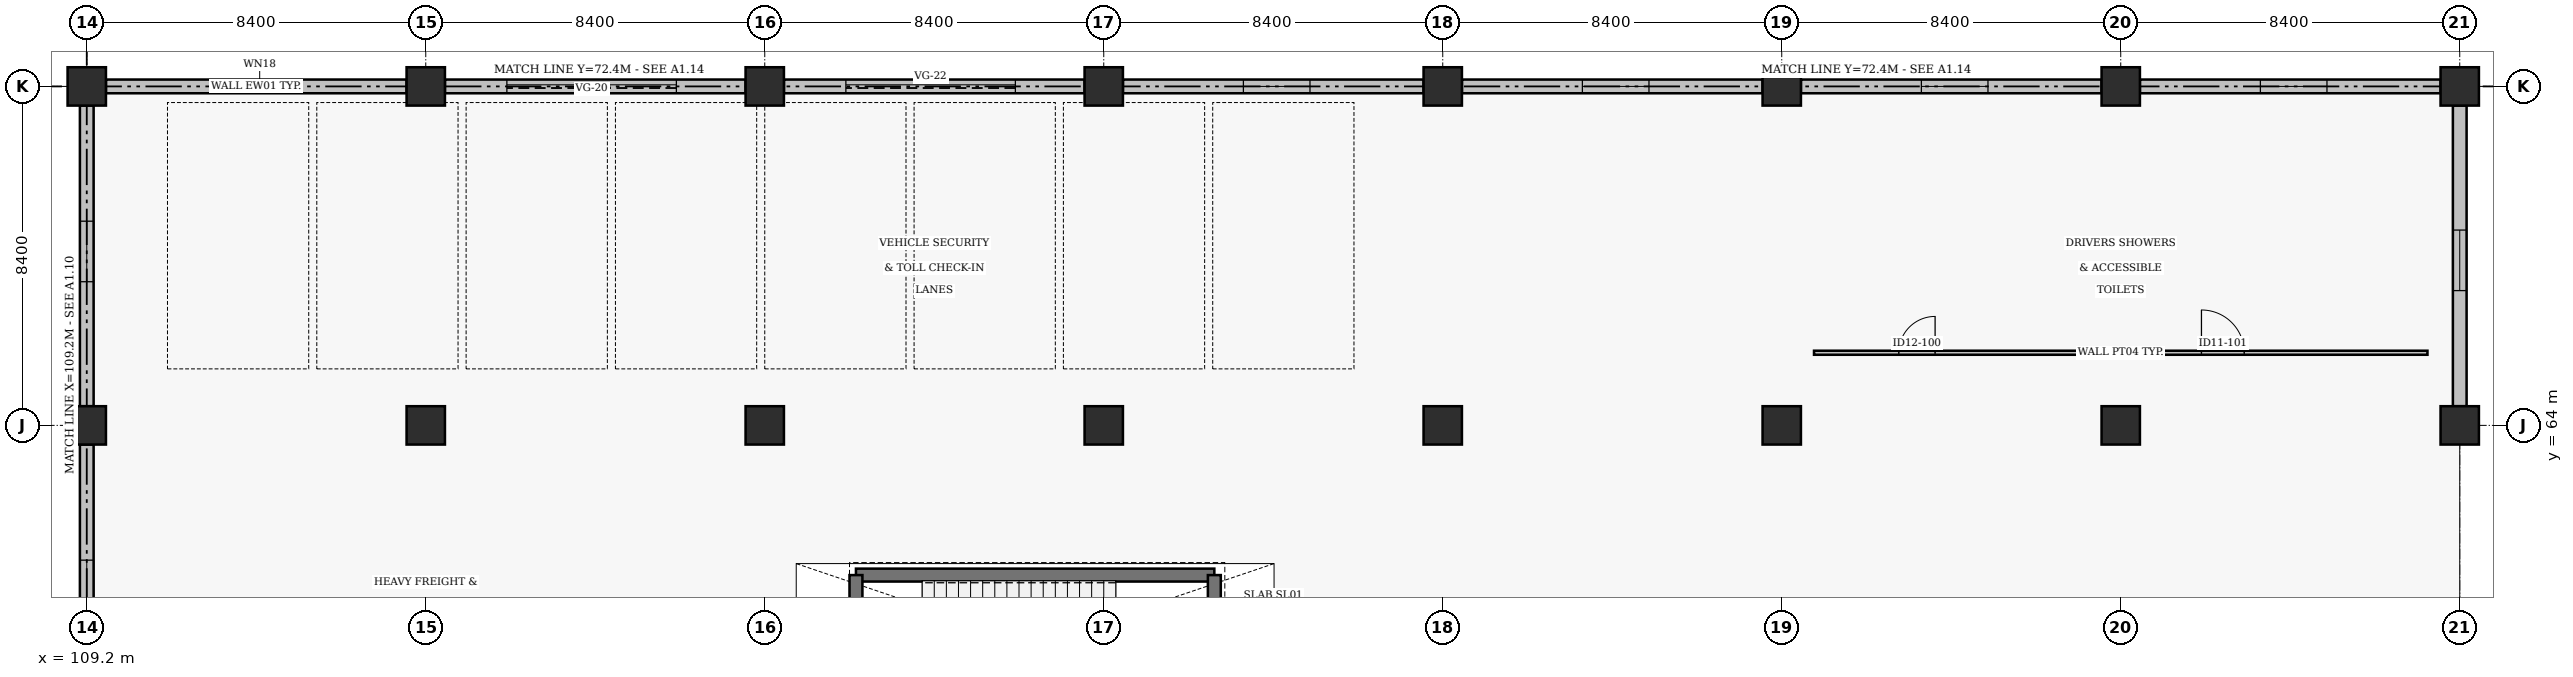
"""IFC4 building model, lengths in metres.
Left out: names, types, materials, properties, quantities, classifications, styles, units other than length and angle.
Written with IfcOpenShell. Run it as: python <this file> out.ifc"""

import sys

from ifc_helpers import new_model, si_unit, direction, frame, frame_2d, origin, origin_2d, place, context, subcontext, project, spatial, rectangle, extrude, element, fill, save


model = new_model("IFC4")
c1 = context("Model", 3, precision=1e-05, world=origin(), true_north=direction((0.0, 1.0)))
c2 = subcontext(c1, "Body", "Model", "MODEL_VIEW")
j1 = project(units=[si_unit("LENGTHUNIT", "METRE"), si_unit("PLANEANGLEUNIT", "RADIAN")], contexts=[c1])
p1 = place(None, origin())
s1 = spatial("IfcSite", under=j1, at=p1, CompositionType="ELEMENT")
p2 = place(p1, origin())
s2 = spatial("IfcBuilding", under=s1, at=p2, CompositionType="ELEMENT")
p3 = place(p2, origin())
s3 = spatial("IfcBuildingStorey", under=s2, at=p3, CompositionType="ELEMENT", Elevation=0.0)
for number, where, z_axis, x_axis in (
    (1, (109.2, 64.0, -0.46), (0.0, 0.0, 1.0), (1.0, 0.0, 0.0)),
    (2, (109.2, 72.4, -0.46), (0.0, 0.0, 1.0), (1.0, 0.0, 0.0)),
    (3, (117.6, 64.0, -0.46), (0.0, 0.0, 1.0), (1.0, 0.0, 0.0)),
    (4, (117.6, 72.4, -0.46), (0.0, 0.0, 1.0), (1.0, 0.0, 0.0)),
    (5, (126.0, 64.0, -0.46), (0.0, 0.0, 1.0), (1.0, 0.0, 0.0)),
    (6, (126.0, 72.4, -0.46), (0.0, 0.0, 1.0), (1.0, 0.0, 0.0)),
    (7, (134.4, 64.0, -0.46), (0.0, 0.0, 1.0), (1.0, 0.0, 0.0)),
    (8, (134.4, 72.4, -0.46), (0.0, 0.0, 1.0), (1.0, 0.0, 0.0)),
    (9, (142.8, 64.0, -0.46), (0.0, 0.0, 1.0), (1.0, 0.0, 0.0)),
    (10, (142.8, 72.4, -0.46), (0.0, 0.0, 1.0), (1.0, 0.0, 0.0)),
    (11, (151.2, 64.0, -0.46), (0.0, 0.0, 1.0), (1.0, 0.0, 0.0)),
    (12, (151.2, 72.4, -0.46), (0.0, 0.0, 1.0), (1.0, 0.0, 0.0)),
    (13, (159.6, 64.0, -0.46), (0.0, 0.0, 1.0), (1.0, 0.0, 0.0)),
    (14, (159.6, 72.4, -0.46), (0.0, 0.0, 1.0), (1.0, 0.0, 0.0)),
    (15, (168.0, 64.0, -0.46), (0.0, 0.0, 1.0), (1.0, 0.0, 0.0)),
    (16, (168.0, 72.4, -0.46), (0.0, 0.0, 1.0), (1.0, 0.0, 0.0)),
):
    element("IfcColumn", number, at=place(p3, frame(where, z_axis=z_axis, x_axis=x_axis)), inside=s3, PredefinedType="COLUMN", context=c2, shape_type="SweptSolid", body=[
        extrude(rectangle(XDim=0.95, YDim=0.95, at=origin_2d()), origin(), (0.0, 0.0, 1.0), 5.9),
    ])
p4 = place(p3, frame((117.125, 72.4, 0.0), z_axis=(0.0, 0.0, 1.0), x_axis=(-1.0, 0.0, 0.0)))
e17 = element("IfcWall", 17, at=p4, inside=s3, PredefinedType="SOLIDWALL", context=c2, shape_type="SweptSolid", body=[
    extrude(rectangle(XDim=7.45, YDim=0.34, at=frame_2d((3.725, 0.0))), origin(), (0.0, 0.0, 1.0), 4.545),
])
p5 = place(p4, frame((2.815, 0.0, 1.05)))
e18 = element("IfcOpeningElement", 18, at=p5, cuts=e17, PredefinedType="OPENING", context=c2, shape_type="SweptSolid", body=[
    extrude(rectangle(XDim=1.65, YDim=1.4, at=frame_2d((0.825, 0.7))), frame((0.0, 0.18, 0.0), z_axis=(0.0, -1.0, 0.0), x_axis=(1.0, 0.0, 0.0)), (0.0, 0.0, 1.0), 0.36),
])
p6 = place(p3, frame((125.525, 72.4, 0.0), z_axis=(0.0, 0.0, 1.0), x_axis=(-1.0, 0.0, 0.0)))
e19 = element("IfcWall", 19, at=p6, inside=s3, PredefinedType="SOLIDWALL", context=c2, shape_type="SweptSolid", body=[
    extrude(rectangle(XDim=7.45, YDim=0.34, at=frame_2d((3.725, 0.0))), origin(), (0.0, 0.0, 1.0), 4.545),
])
p7 = place(p6, frame((1.715, 0.0, 0.0)))
e20 = element("IfcOpeningElement", 20, at=p7, cuts=e19, PredefinedType="OPENING", context=c2, shape_type="SweptSolid", body=[
    extrude(rectangle(XDim=4.2, YDim=4.3, at=frame_2d((2.1, 2.15))), frame((0.0, 0.18, 0.0), z_axis=(0.0, -1.0, 0.0), x_axis=(1.0, 0.0, 0.0)), (0.0, 0.0, 1.0), 0.36),
])
p8 = place(p3, frame((133.925, 72.4, 0.0), z_axis=(0.0, 0.0, 1.0), x_axis=(-1.0, 0.0, 0.0)))
e21 = element("IfcWall", 21, at=p8, inside=s3, PredefinedType="SOLIDWALL", context=c2, shape_type="SweptSolid", body=[
    extrude(rectangle(XDim=7.45, YDim=0.34, at=frame_2d((3.725, 0.0))), origin(), (0.0, 0.0, 1.0), 4.545),
])
p9 = place(p8, frame((1.715, 0.0, 0.0)))
e22 = element("IfcOpeningElement", 22, at=p9, cuts=e21, PredefinedType="OPENING", context=c2, shape_type="SweptSolid", body=[
    extrude(rectangle(XDim=4.2, YDim=4.3, at=frame_2d((2.1, 2.15))), frame((0.0, 0.18, 0.0), z_axis=(0.0, -1.0, 0.0), x_axis=(1.0, 0.0, 0.0)), (0.0, 0.0, 1.0), 0.36),
])
p10 = place(p3, frame((142.325, 72.4, 0.0), z_axis=(0.0, 0.0, 1.0), x_axis=(-1.0, 0.0, 0.0)))
e23 = element("IfcWall", 23, at=p10, inside=s3, PredefinedType="SOLIDWALL", context=c2, shape_type="SweptSolid", body=[
    extrude(rectangle(XDim=7.45, YDim=0.34, at=frame_2d((3.725, 0.0))), origin(), (0.0, 0.0, 1.0), 4.545),
])
p11 = place(p10, frame((2.815, 0.0, 1.05)))
e24 = element("IfcOpeningElement", 24, at=p11, cuts=e23, PredefinedType="OPENING", context=c2, shape_type="SweptSolid", body=[
    extrude(rectangle(XDim=1.65, YDim=1.4, at=frame_2d((0.825, 0.7))), frame((0.0, 0.18, 0.0), z_axis=(0.0, -1.0, 0.0), x_axis=(1.0, 0.0, 0.0)), (0.0, 0.0, 1.0), 0.36),
])
p12 = place(p3, frame((150.725, 72.4, 0.0), z_axis=(0.0, 0.0, 1.0), x_axis=(-1.0, 0.0, 0.0)))
e25 = element("IfcWall", 25, at=p12, inside=s3, PredefinedType="SOLIDWALL", context=c2, shape_type="SweptSolid", body=[
    extrude(rectangle(XDim=7.45, YDim=0.34, at=frame_2d((3.725, 0.0))), origin(), (0.0, 0.0, 1.0), 4.545),
])
p13 = place(p12, frame((2.815, 0.0, 1.05)))
e26 = element("IfcOpeningElement", 26, at=p13, cuts=e25, PredefinedType="OPENING", context=c2, shape_type="SweptSolid", body=[
    extrude(rectangle(XDim=1.65, YDim=1.4, at=frame_2d((0.825, 0.7))), frame((0.0, 0.18, 0.0), z_axis=(0.0, -1.0, 0.0), x_axis=(1.0, 0.0, 0.0)), (0.0, 0.0, 1.0), 0.36),
])
p14 = place(p3, frame((159.125, 72.4, 0.0), z_axis=(0.0, 0.0, 1.0), x_axis=(-1.0, 0.0, 0.0)))
e27 = element("IfcWall", 27, at=p14, inside=s3, PredefinedType="SOLIDWALL", context=c2, shape_type="SweptSolid", body=[
    extrude(rectangle(XDim=7.45, YDim=0.34, at=frame_2d((3.725, 0.0))), origin(), (0.0, 0.0, 1.0), 4.545),
])
p15 = place(p14, frame((2.815, 0.0, 1.05)))
e28 = element("IfcOpeningElement", 28, at=p15, cuts=e27, PredefinedType="OPENING", context=c2, shape_type="SweptSolid", body=[
    extrude(rectangle(XDim=1.65, YDim=1.4, at=frame_2d((0.825, 0.7))), frame((0.0, 0.18, 0.0), z_axis=(0.0, -1.0, 0.0), x_axis=(1.0, 0.0, 0.0)), (0.0, 0.0, 1.0), 0.36),
])
p16 = place(p3, frame((167.525, 72.4, 0.0), z_axis=(0.0, 0.0, 1.0), x_axis=(-1.0, 0.0, 0.0)))
e29 = element("IfcWall", 29, at=p16, inside=s3, PredefinedType="SOLIDWALL", context=c2, shape_type="SweptSolid", body=[
    extrude(rectangle(XDim=7.45, YDim=0.34, at=frame_2d((3.725, 0.0))), origin(), (0.0, 0.0, 1.0), 4.545),
])
p17 = place(p16, frame((2.815, 0.0, 1.05)))
e30 = element("IfcOpeningElement", 30, at=p17, cuts=e29, PredefinedType="OPENING", context=c2, shape_type="SweptSolid", body=[
    extrude(rectangle(XDim=1.65, YDim=1.4, at=frame_2d((0.825, 0.7))), frame((0.0, 0.18, 0.0), z_axis=(0.0, -1.0, 0.0), x_axis=(1.0, 0.0, 0.0)), (0.0, 0.0, 1.0), 0.36),
])
p18 = place(p3, frame((109.2, 63.525, 0.0), z_axis=(0.0, 0.0, 1.0), x_axis=(0.0, -1.0, 0.0)))
e31 = element("IfcWall", 31, at=p18, inside=s3, PredefinedType="SOLIDWALL", context=c2, shape_type="SweptSolid", body=[
    extrude(rectangle(XDim=7.45, YDim=0.34, at=frame_2d((3.725, 0.0))), origin(), (0.0, 0.0, 1.0), 4.545),
])
p19 = place(p18, frame((2.865, 0.0, 1.35)))
e32 = element("IfcOpeningElement", 32, at=p19, cuts=e31, PredefinedType="OPENING", context=c2, shape_type="SweptSolid", body=[
    extrude(rectangle(XDim=1.5, YDim=1.1, at=frame_2d((0.75, 0.55))), frame((0.0, 0.18, 0.0), z_axis=(0.0, -1.0, 0.0), x_axis=(1.0, 0.0, 0.0)), (0.0, 0.0, 1.0), 0.36),
])
p20 = place(p3, frame((109.2, 71.925, 0.0), z_axis=(0.0, 0.0, 1.0), x_axis=(0.0, -1.0, 0.0)))
e33 = element("IfcWall", 33, at=p20, inside=s3, PredefinedType="SOLIDWALL", context=c2, shape_type="SweptSolid", body=[
    extrude(rectangle(XDim=7.45, YDim=0.34, at=frame_2d((3.725, 0.0))), origin(), (0.0, 0.0, 1.0), 4.545),
])
p21 = place(p20, frame((2.865, 0.0, 1.35)))
e34 = element("IfcOpeningElement", 34, at=p21, cuts=e33, PredefinedType="OPENING", context=c2, shape_type="SweptSolid", body=[
    extrude(rectangle(XDim=1.5, YDim=1.1, at=frame_2d((0.75, 0.55))), frame((0.0, 0.18, 0.0), z_axis=(0.0, -1.0, 0.0), x_axis=(1.0, 0.0, 0.0)), (0.0, 0.0, 1.0), 0.36),
])
p22 = place(p3, frame((168.0, 64.475, 0.0), z_axis=(0.0, 0.0, 1.0), x_axis=(0.0, 1.0, 0.0)))
e35 = element("IfcWall", 35, at=p22, inside=s3, PredefinedType="SOLIDWALL", context=c2, shape_type="SweptSolid", body=[
    extrude(rectangle(XDim=7.45, YDim=0.34, at=frame_2d((3.725, 0.0))), origin(), (0.0, 0.0, 1.0), 4.545),
])
p23 = place(p22, frame((2.865, 0.0, 1.35)))
e36 = element("IfcOpeningElement", 36, at=p23, cuts=e35, PredefinedType="OPENING", context=c2, shape_type="SweptSolid", body=[
    extrude(rectangle(XDim=1.5, YDim=1.1, at=frame_2d((0.75, 0.55))), frame((0.0, 0.18, 0.0), z_axis=(0.0, -1.0, 0.0), x_axis=(1.0, 0.0, 0.0)), (0.0, 0.0, 1.0), 0.36),
])
p24 = place(p3, frame((128.26, 60.29, 0.0), z_axis=(0.0, 0.0, 1.0), x_axis=(1.0, 0.0, 0.0)))
e37 = element("IfcWall", 37, at=p24, inside=s3, PredefinedType="SHEAR", context=c2, shape_type="SweptSolid", body=[
    extrude(rectangle(XDim=8.88, YDim=0.32, at=frame_2d((4.44, 0.0))), origin(), (0.0, 0.0, 1.0), 5.44),
])
p25 = place(p3, frame((128.26, 60.29, 0.0), z_axis=(0.0, 0.0, 1.0), x_axis=(0.0, -1.0, 0.0)))
e38 = element("IfcWall", 38, at=p25, inside=s3, PredefinedType="SHEAR", context=c2, shape_type="SweptSolid", body=[
    extrude(rectangle(XDim=3.43, YDim=0.32, at=frame_2d((1.715, 0.0))), origin(), (0.0, 0.0, 1.0), 5.44),
])
p26 = place(p25, frame((0.975, 0.0, 0.0)))
e39 = element("IfcOpeningElement", 39, at=p26, cuts=e38, PredefinedType="OPENING", context=c2, shape_type="SweptSolid", body=[
    extrude(rectangle(XDim=1.48, YDim=2.15, at=frame_2d((0.74, 1.075))), frame((0.0, 0.17, 0.0), z_axis=(0.0, -1.0, 0.0), x_axis=(1.0, 0.0, 0.0)), (0.0, 0.0, 1.0), 0.34),
])
p27 = place(p3, frame((137.14, 56.86, 0.0), z_axis=(0.0, 0.0, 1.0), x_axis=(0.0, 1.0, 0.0)))
e40 = element("IfcWall", 40, at=p27, inside=s3, PredefinedType="SHEAR", context=c2, shape_type="SweptSolid", body=[
    extrude(rectangle(XDim=3.43, YDim=0.32, at=frame_2d((1.715, 0.0))), origin(), (0.0, 0.0, 1.0), 5.44),
])
p28 = place(p3, frame((152.0, 65.8, 0.0), z_axis=(0.0, 0.0, 1.0), x_axis=(1.0, 0.0, 0.0)))
e41 = element("IfcWall", 41, at=p28, inside=s3, PredefinedType="PARTITIONING", context=c2, shape_type="SweptSolid", body=[
    extrude(rectangle(XDim=15.2, YDim=0.1, at=frame_2d((7.6, 0.0))), origin(), (0.0, 0.0, 1.0), 3.0),
])
p29 = place(p28, frame((2.1, 0.0, 0.0)))
e42 = element("IfcOpeningElement", 42, at=p29, cuts=e41, PredefinedType="OPENING", context=c2, shape_type="SweptSolid", body=[
    extrude(rectangle(XDim=0.9, YDim=2.06, at=frame_2d((0.45, 1.03))), frame((0.0, 0.06, 0.0), z_axis=(0.0, -1.0, 0.0), x_axis=(1.0, 0.0, 0.0)), (0.0, 0.0, 1.0), 0.12),
])
p30 = place(p28, frame((9.6, 0.0, 0.0)))
e43 = element("IfcOpeningElement", 43, at=p30, cuts=e41, PredefinedType="OPENING", context=c2, shape_type="SweptSolid", body=[
    extrude(rectangle(XDim=1.06, YDim=2.1, at=frame_2d((0.53, 1.05))), frame((0.0, 0.06, 0.0), z_axis=(0.0, -1.0, 0.0), x_axis=(1.0, 0.0, 0.0)), (0.0, 0.0, 1.0), 0.12),
])
p31 = place(p5, origin())
e44 = element("IfcWindow", 44, at=p31, inside=s3, PartitioningType="DOUBLE_PANEL_VERTICAL", PredefinedType="WINDOW", context=c2, shape_type="SweptSolid", body=[
    extrude(rectangle(XDim=1.65, YDim=1.4, at=frame_2d((0.825, 0.7))), frame((0.0, 0.03, 0.0), z_axis=(0.0, -1.0, 0.0), x_axis=(1.0, 0.0, 0.0)), (0.0, 0.0, 1.0), 0.06),
])
fill(e18, e44)
p32 = place(p7, origin())
e45 = element("IfcDoor", 45, at=p32, inside=s3, OperationType="ROLLINGUP", PredefinedType="GATE", context=c2, shape_type="SweptSolid", body=[
    extrude(rectangle(XDim=4.2, YDim=4.3, at=frame_2d((2.1, 2.15))), frame((0.0, 0.025, 0.0), z_axis=(0.0, -1.0, 0.0), x_axis=(1.0, 0.0, 0.0)), (0.0, 0.0, 1.0), 0.05),
])
fill(e20, e45)
p33 = place(p9, origin())
e46 = element("IfcDoor", 46, at=p33, inside=s3, OperationType="ROLLINGUP", PredefinedType="GATE", context=c2, shape_type="SweptSolid", body=[
    extrude(rectangle(XDim=4.2, YDim=4.3, at=frame_2d((2.1, 2.15))), frame((0.0, 0.025, 0.0), z_axis=(0.0, -1.0, 0.0), x_axis=(1.0, 0.0, 0.0)), (0.0, 0.0, 1.0), 0.05),
])
fill(e22, e46)
p34 = place(p11, origin())
e47 = element("IfcWindow", 47, at=p34, inside=s3, PartitioningType="DOUBLE_PANEL_VERTICAL", PredefinedType="WINDOW", context=c2, shape_type="SweptSolid", body=[
    extrude(rectangle(XDim=1.65, YDim=1.4, at=frame_2d((0.825, 0.7))), frame((0.0, 0.03, 0.0), z_axis=(0.0, -1.0, 0.0), x_axis=(1.0, 0.0, 0.0)), (0.0, 0.0, 1.0), 0.06),
])
fill(e24, e47)
p35 = place(p13, origin())
e48 = element("IfcWindow", 48, at=p35, inside=s3, PartitioningType="DOUBLE_PANEL_VERTICAL", PredefinedType="WINDOW", context=c2, shape_type="SweptSolid", body=[
    extrude(rectangle(XDim=1.65, YDim=1.4, at=frame_2d((0.825, 0.7))), frame((0.0, 0.03, 0.0), z_axis=(0.0, -1.0, 0.0), x_axis=(1.0, 0.0, 0.0)), (0.0, 0.0, 1.0), 0.06),
])
fill(e26, e48)
p36 = place(p15, origin())
e49 = element("IfcWindow", 49, at=p36, inside=s3, PartitioningType="DOUBLE_PANEL_VERTICAL", PredefinedType="WINDOW", context=c2, shape_type="SweptSolid", body=[
    extrude(rectangle(XDim=1.65, YDim=1.4, at=frame_2d((0.825, 0.7))), frame((0.0, 0.03, 0.0), z_axis=(0.0, -1.0, 0.0), x_axis=(1.0, 0.0, 0.0)), (0.0, 0.0, 1.0), 0.06),
])
fill(e28, e49)
p37 = place(p17, origin())
e50 = element("IfcWindow", 50, at=p37, inside=s3, PartitioningType="DOUBLE_PANEL_VERTICAL", PredefinedType="WINDOW", context=c2, shape_type="SweptSolid", body=[
    extrude(rectangle(XDim=1.65, YDim=1.4, at=frame_2d((0.825, 0.7))), frame((0.0, 0.03, 0.0), z_axis=(0.0, -1.0, 0.0), x_axis=(1.0, 0.0, 0.0)), (0.0, 0.0, 1.0), 0.06),
])
fill(e30, e50)
p38 = place(p19, origin())
e51 = element("IfcWindow", 51, at=p38, inside=s3, PartitioningType="SINGLE_PANEL", PredefinedType="WINDOW", context=c2, shape_type="SweptSolid", body=[
    extrude(rectangle(XDim=1.5, YDim=1.1, at=frame_2d((0.75, 0.55))), frame((0.0, 0.03, 0.0), z_axis=(0.0, -1.0, 0.0), x_axis=(1.0, 0.0, 0.0)), (0.0, 0.0, 1.0), 0.06),
])
fill(e32, e51)
p39 = place(p21, origin())
e52 = element("IfcWindow", 52, at=p39, inside=s3, PartitioningType="SINGLE_PANEL", PredefinedType="WINDOW", context=c2, shape_type="SweptSolid", body=[
    extrude(rectangle(XDim=1.5, YDim=1.1, at=frame_2d((0.75, 0.55))), frame((0.0, 0.03, 0.0), z_axis=(0.0, -1.0, 0.0), x_axis=(1.0, 0.0, 0.0)), (0.0, 0.0, 1.0), 0.06),
])
fill(e34, e52)
p40 = place(p23, origin())
e53 = element("IfcWindow", 53, at=p40, inside=s3, PartitioningType="SINGLE_PANEL", PredefinedType="WINDOW", context=c2, shape_type="SweptSolid", body=[
    extrude(rectangle(XDim=1.5, YDim=1.1, at=frame_2d((0.75, 0.55))), frame((0.0, 0.03, 0.0), z_axis=(0.0, -1.0, 0.0), x_axis=(1.0, 0.0, 0.0)), (0.0, 0.0, 1.0), 0.06),
])
fill(e36, e53)
p41 = place(p29, origin())
e54 = element("IfcDoor", 54, at=p41, inside=s3, OperationType="SINGLE_SWING_RIGHT", PredefinedType="DOOR", context=c2, shape_type="SweptSolid", body=[
    extrude(rectangle(XDim=0.9, YDim=2.06, at=frame_2d((0.45, 1.03))), frame((0.0, 0.025, 0.0), z_axis=(0.0, -1.0, 0.0), x_axis=(1.0, 0.0, 0.0)), (0.0, 0.0, 1.0), 0.05),
])
fill(e42, e54)
p42 = place(p30, origin())
e55 = element("IfcDoor", 55, at=p42, inside=s3, OperationType="SINGLE_SWING_LEFT", PredefinedType="DOOR", context=c2, shape_type="SweptSolid", body=[
    extrude(rectangle(XDim=1.06, YDim=2.1, at=frame_2d((0.53, 1.05))), frame((0.0, 0.025, 0.0), z_axis=(0.0, -1.0, 0.0), x_axis=(1.0, 0.0, 0.0)), (0.0, 0.0, 1.0), 0.05),
])
fill(e43, e55)
save(model, sys.argv[1])
